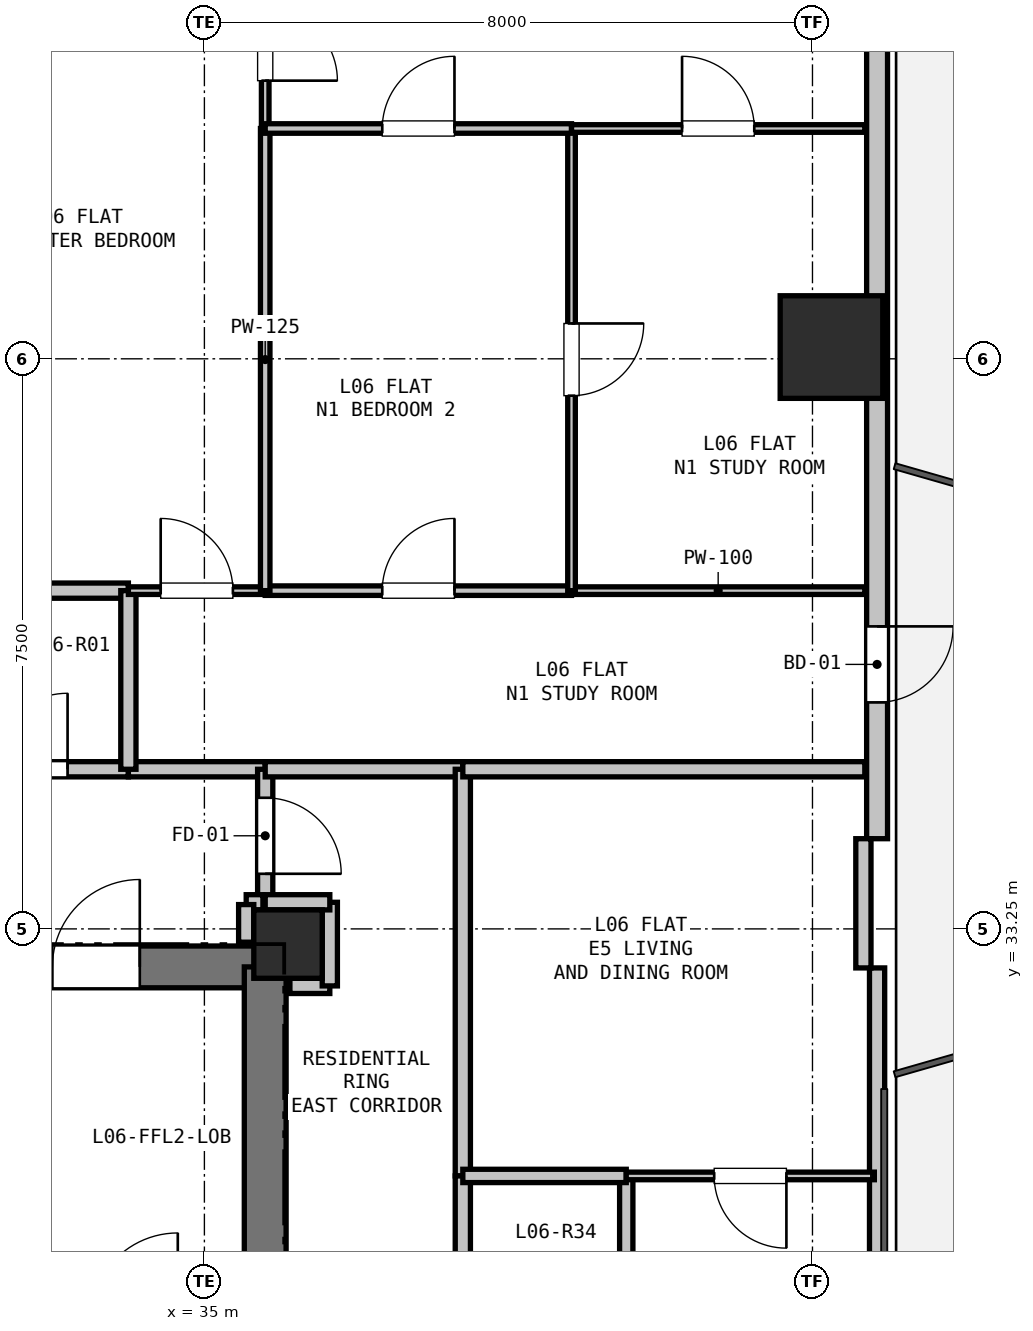
"""IFC4 building model, lengths in metres.
Left out: names, types, materials, properties, quantities, classifications, styles, units other than length and angle.
Written with IfcOpenShell. Run it as: python <this file> out.ifc"""

import sys

from ifc_helpers import new_model, si_unit, direction, frame, frame_2d, origin, origin_2d, place, context, subcontext, project, spatial, rectangle, hollow_rectangle, extrude, element, fill, save


model = new_model("IFC4")
c1 = context("Model", 3, precision=1e-05, world=origin(), true_north=direction((0.0, 1.0)))
c2 = subcontext(c1, "Body", "Model", "MODEL_VIEW")
j1 = project(units=[si_unit("LENGTHUNIT", "METRE"), si_unit("PLANEANGLEUNIT", "RADIAN")], contexts=[c1])
p1 = place(None, origin())
s1 = spatial("IfcSite", under=j1, at=p1, CompositionType="ELEMENT")
p2 = place(p1, origin())
s2 = spatial("IfcBuilding", under=s1, at=p2, CompositionType="ELEMENT")
p3 = place(p2, frame((0.0, 0.0, 25.8)))
s3 = spatial("IfcBuildingStorey", under=s2, at=p3, CompositionType="ELEMENT", Elevation=25.8)
p4 = place(p3, frame((36.1, 33.05, 0.0), z_axis=(0.0, 0.0, 1.0), x_axis=(1.0, 0.0, 0.0)))
e1 = element("IfcColumn", 1, at=p4, inside=s3, PredefinedType="COLUMN", context=c2, shape_type="SweptSolid", body=[
    extrude(rectangle(XDim=0.9, YDim=0.9, at=origin_2d()), origin(), (0.0, 0.0, 1.0), 3.3),
])
p5 = place(p3, frame((43.25, 40.905, 0.0), z_axis=(0.0, 0.0, 1.0), x_axis=(1.0, 0.0, 0.0)))
e2 = element("IfcColumn", 2, at=p5, inside=s3, PredefinedType="COLUMN", context=c2, shape_type="SweptSolid", body=[
    extrude(hollow_rectangle(XDim=1.35, YDim=1.35, WallThickness=0.036, at=origin_2d()), origin(), (0.0, 0.0, 1.0), 3.3),
])
p6 = place(p3, frame((28.232, 43.454, 0.0), z_axis=(0.0, 0.0, 1.0), x_axis=(0.86603192154, 0.499988710747, 0.0)))
e3 = element("IfcWall", 3, at=p6, inside=s3, PredefinedType="SOLIDWALL", context=c2, shape_type="SweptSolid", body=[
    extrude(rectangle(XDim=12.673, YDim=0.275, at=frame_2d((6.336, 0.0))), origin(), (0.0, 0.0, 1.0), 2.66),
])
p7 = place(p6, frame((4.68, 0.0, 0.9)))
e4 = element("IfcOpeningElement", 4, at=p7, cuts=e3, PredefinedType="OPENING", context=c2, shape_type="SweptSolid", body=[
    extrude(rectangle(XDim=1.2, YDim=1.4, at=frame_2d((0.6, 0.7))), frame((0.0, 0.147, 0.0), z_axis=(0.0, -1.0, 0.0), x_axis=(1.0, 0.0, 0.0)), (0.0, 0.0, 1.0), 0.295),
])
p8 = place(p3, frame((43.85, 47.11, 0.0), z_axis=(0.0, 0.0, 1.0), x_axis=(0.0, -1.0, 0.0)))
e5 = element("IfcWall", 5, at=p8, inside=s3, PredefinedType="SOLIDWALL", context=c2, shape_type="SweptSolid", body=[
    extrude(rectangle(XDim=12.673, YDim=0.275, at=frame_2d((6.336, 0.0))), origin(), (0.0, 0.0, 1.0), 2.66),
])
p9 = place(p8, frame((9.88, 0.0, 0.0)))
e6 = element("IfcOpeningElement", 6, at=p9, cuts=e5, PredefinedType="OPENING", context=c2, shape_type="SweptSolid", body=[
    extrude(rectangle(XDim=1.0, YDim=2.1, at=frame_2d((0.5, 1.05))), frame((0.0, 0.147, 0.0), z_axis=(0.0, -1.0, 0.0), x_axis=(1.0, 0.0, 0.0)), (0.0, 0.0, 1.0), 0.295),
])
p10 = place(p3, frame((43.85, 32.737, 0.0), z_axis=(0.0, 0.0, 1.0), x_axis=(0.0, -1.0, 0.0)))
e7 = element("IfcWall", 7, at=p10, inside=s3, PredefinedType="PARAPET", context=c2, shape_type="SweptSolid", body=[
    extrude(rectangle(XDim=11.973, YDim=0.2, at=frame_2d((5.987, 0.0))), origin(), (0.0, 0.0, 1.0), 0.2),
])
p11 = place(p3, frame((43.67, 34.437, 0.0), z_axis=(0.0, 0.0, 1.0), x_axis=(0.0, -1.0, 0.0)))
e8 = element("IfcWall", 8, at=p11, inside=s3, PredefinedType="PARAPET", context=c2, shape_type="SweptSolid", body=[
    extrude(rectangle(XDim=1.7, YDim=0.2, at=frame_2d((0.85, 0.0))), origin(), (0.0, 0.0, 1.0), 2.66),
])
p12 = place(p3, frame((32.35, 32.75, 0.0), z_axis=(0.0, 0.0, 1.0), x_axis=(1.0, 0.0, 0.0)))
e9 = element("IfcWall", 9, at=p12, inside=s3, PredefinedType="SHEAR", context=c2, shape_type="SweptSolid", body=[
    extrude(rectangle(XDim=3.45, YDim=0.55, at=frame_2d((1.725, 0.0))), origin(), (0.0, 0.0, 1.0), 3.04),
])
p13 = place(p12, frame((0.65, 0.0, 0.0)))
e10 = element("IfcOpeningElement", 10, at=p13, cuts=e9, PredefinedType="OPENING", context=c2, shape_type="SweptSolid", body=[
    extrude(rectangle(XDim=1.15, YDim=2.15, at=frame_2d((0.575, 1.075))), frame((0.0, 0.285, 0.0), z_axis=(0.0, -1.0, 0.0), x_axis=(1.0, 0.0, 0.0)), (0.0, 0.0, 1.0), 0.57),
])
p14 = place(p3, frame((35.8, 32.75, 0.0), z_axis=(0.0, 0.0, 1.0), x_axis=(0.0, -1.0, 0.0)))
e11 = element("IfcWall", 11, at=p14, inside=s3, PredefinedType="SHEAR", context=c2, shape_type="SweptSolid", body=[
    extrude(rectangle(XDim=4.65, YDim=0.55, at=frame_2d((2.325, 0.0))), origin(), (0.0, 0.0, 1.0), 3.04),
])
p15 = place(p3, frame((31.4, 35.35, 0.0), z_axis=(0.0, 0.0, 1.0), x_axis=(1.0, 0.0, 0.0)))
e12 = element("IfcWall", 12, at=p15, inside=s3, PredefinedType="PARTITIONING", context=c2, shape_type="SweptSolid", body=[
    extrude(rectangle(XDim=2.6, YDim=0.2, at=frame_2d((1.3, 0.0))), origin(), (0.0, 0.0, 1.0), 3.04),
])
p16 = place(p15, frame((0.8, 0.0, 0.0)))
e13 = element("IfcOpeningElement", 13, at=p16, cuts=e12, PredefinedType="OPENING", context=c2, shape_type="SweptSolid", body=[
    extrude(rectangle(XDim=1.0, YDim=2.15, at=frame_2d((0.5, 1.075))), frame((0.0, 0.11, 0.0), z_axis=(0.0, -1.0, 0.0), x_axis=(1.0, 0.0, 0.0)), (0.0, 0.0, 1.0), 0.22),
])
p17 = place(p3, frame((34.0, 35.35, 0.0), z_axis=(0.0, 0.0, 1.0), x_axis=(1.0, 0.0, 0.0)))
e14 = element("IfcWall", 14, at=p17, inside=s3, PredefinedType="PARTITIONING", context=c2, shape_type="SweptSolid", body=[
    extrude(rectangle(XDim=1.8, YDim=0.2, at=frame_2d((0.9, 0.0))), origin(), (0.0, 0.0, 1.0), 3.04),
])
p18 = place(p3, frame((35.8, 35.35, 0.0), z_axis=(0.0, 0.0, 1.0), x_axis=(0.0, -1.0, 0.0)))
e15 = element("IfcWall", 15, at=p18, inside=s3, PredefinedType="PARTITIONING", context=c2, shape_type="SweptSolid", body=[
    extrude(rectangle(XDim=1.75, YDim=0.2, at=frame_2d((0.875, 0.0))), origin(), (0.0, 0.0, 1.0), 3.04),
])
p19 = place(p18, frame((0.375, 0.0, 0.0)))
e16 = element("IfcOpeningElement", 16, at=p19, cuts=e15, PredefinedType="OPENING", context=c2, shape_type="SweptSolid", body=[
    extrude(rectangle(XDim=1.0, YDim=2.15, at=frame_2d((0.5, 1.075))), frame((0.0, 0.11, 0.0), z_axis=(0.0, -1.0, 0.0), x_axis=(1.0, 0.0, 0.0)), (0.0, 0.0, 1.0), 0.22),
])
p20 = place(p3, frame((35.77, 33.6, 0.0), z_axis=(0.0, 0.0, 1.0), x_axis=(-1.0, 0.0, 0.0)))
e17 = element("IfcWall", 17, at=p20, inside=s3, PredefinedType="PARTITIONING", context=c2, shape_type="SweptSolid", body=[
    extrude(rectangle(XDim=0.22, YDim=0.2, at=frame_2d((0.11, 0.0))), origin(), (0.0, 0.0, 1.0), 3.04),
])
p21 = place(p3, frame((35.55, 33.57, 0.0), z_axis=(0.0, 0.0, 1.0), x_axis=(0.0, -1.0, 0.0)))
e18 = element("IfcWall", 18, at=p21, inside=s3, PredefinedType="PARTITIONING", context=c2, shape_type="SweptSolid", body=[
    extrude(rectangle(XDim=0.495, YDim=0.2, at=frame_2d((0.248, 0.0))), origin(), (0.0, 0.0, 1.0), 2.488),
])
p22 = place(p3, frame((36.125, 32.5, 0.0), z_axis=(0.0, 0.0, 1.0), x_axis=(1.0, 0.0, 0.0)))
e19 = element("IfcWall", 19, at=p22, inside=s3, PredefinedType="PARTITIONING", context=c2, shape_type="SweptSolid", body=[
    extrude(rectangle(XDim=0.525, YDim=0.2, at=frame_2d((0.262, 0.0))), origin(), (0.0, 0.0, 1.0), 2.488),
])
p23 = place(p3, frame((36.65, 32.5, 0.0), z_axis=(0.0, 0.0, 1.0), x_axis=(0.0, 1.0, 0.0)))
e20 = element("IfcWall", 20, at=p23, inside=s3, PredefinedType="PARTITIONING", context=c2, shape_type="SweptSolid", body=[
    extrude(rectangle(XDim=1.1, YDim=0.2, at=frame_2d((0.55, 0.0))), origin(), (0.0, 0.0, 1.0), 2.337),
])
p24 = place(p3, frame((36.65, 33.6, 0.0), z_axis=(0.0, 0.0, 1.0), x_axis=(-1.0, 0.0, 0.0)))
e21 = element("IfcWall", 21, at=p24, inside=s3, PredefinedType="PARTITIONING", context=c2, shape_type="SweptSolid", body=[
    extrude(rectangle(XDim=0.85, YDim=0.2, at=frame_2d((0.425, 0.0))), origin(), (0.0, 0.0, 1.0), 2.337),
])
p25 = place(p3, frame((35.8, 35.35, 0.0), z_axis=(0.0, 0.0, 1.0), x_axis=(1.0, 0.0, 0.0)))
e22 = element("IfcWall", 22, at=p25, inside=s3, PredefinedType="PARTITIONING", context=c2, shape_type="SweptSolid", body=[
    extrude(rectangle(XDim=2.6, YDim=0.2, at=frame_2d((1.3, 0.0))), origin(), (0.0, 0.0, 1.0), 2.337),
])
p26 = place(p3, frame((38.4, 35.35, 0.0), z_axis=(0.0, 0.0, 1.0), x_axis=(0.0, -1.0, 0.0)))
e23 = element("IfcWall", 23, at=p26, inside=s3, PredefinedType="PARTITIONING", context=c2, shape_type="SweptSolid", body=[
    extrude(rectangle(XDim=5.35, YDim=0.2, at=frame_2d((2.675, 0.0))), origin(), (0.0, 0.0, 1.0), 2.337),
])
p27 = place(p3, frame((38.4, 30.0, 0.0), z_axis=(0.0, 0.0, 1.0), x_axis=(0.0, -1.0, 0.0)))
e24 = element("IfcWall", 24, at=p27, inside=s3, PredefinedType="PARTITIONING", context=c2, shape_type="SweptSolid", body=[
    extrude(rectangle(XDim=2.4, YDim=0.2, at=frame_2d((1.2, 0.0))), origin(), (0.0, 0.0, 1.0), 3.04),
])
p28 = place(p3, frame((40.55, 30.0, 0.0), z_axis=(0.0, 0.0, 1.0), x_axis=(0.0, -1.0, 0.0)))
e25 = element("IfcWall", 25, at=p28, inside=s3, PredefinedType="PLUMBINGWALL", context=c2, shape_type="SweptSolid", body=[
    extrude(rectangle(XDim=2.4, YDim=0.175, at=frame_2d((1.2, 0.0))), origin(), (0.0, 0.0, 1.0), 3.04),
])
p29 = place(p3, frame((38.4, 30.0, 0.0), z_axis=(0.0, 0.0, 1.0), x_axis=(1.0, 0.0, 0.0)))
e26 = element("IfcWall", 26, at=p29, inside=s3, PredefinedType="PLUMBINGWALL", context=c2, shape_type="SweptSolid", body=[
    extrude(rectangle(XDim=2.15, YDim=0.175, at=frame_2d((1.075, 0.0))), origin(), (0.0, 0.0, 1.0), 3.04),
])
p30 = place(p3, frame((31.4, 37.7, 0.0), z_axis=(0.0, 0.0, 1.0), x_axis=(1.0, 0.0, 0.0)))
e27 = element("IfcWall", 27, at=p30, inside=s3, PredefinedType="PARTITIONING", context=c2, shape_type="SweptSolid", body=[
    extrude(rectangle(XDim=2.6, YDim=0.2, at=frame_2d((1.3, 0.0))), origin(), (0.0, 0.0, 1.0), 3.04),
])
p31 = place(p3, frame((34.0, 37.7, 0.0), z_axis=(0.0, 0.0, 1.0), x_axis=(0.0, -1.0, 0.0)))
e28 = element("IfcWall", 28, at=p31, inside=s3, PredefinedType="PARTITIONING", context=c2, shape_type="SweptSolid", body=[
    extrude(rectangle(XDim=2.35, YDim=0.2, at=frame_2d((1.175, 0.0))), origin(), (0.0, 0.0, 1.0), 3.04),
])
p32 = place(p3, frame((43.688, 35.35, 0.0), z_axis=(0.0, 0.0, 1.0), x_axis=(-1.0, 0.0, 0.0)))
e29 = element("IfcWall", 29, at=p32, inside=s3, PredefinedType="PARTITIONING", context=c2, shape_type="SweptSolid", body=[
    extrude(rectangle(XDim=5.289, YDim=0.2, at=frame_2d((2.644, 0.0))), origin(), (0.0, 0.0, 1.0), 2.337),
])
p33 = place(p3, frame((34.0, 37.7, 0.0), z_axis=(0.0, 0.0, 1.0), x_axis=(1.0, 0.0, 0.0)))
e30 = element("IfcWall", 30, at=p33, inside=s3, PredefinedType="PARTITIONING", context=c2, shape_type="SweptSolid", body=[
    extrude(rectangle(XDim=1.8, YDim=0.1, at=frame_2d((0.9, 0.0))), origin(), (0.0, 0.0, 1.0), 3.04),
])
p34 = place(p33, frame((0.425, 0.0, 0.0)))
e31 = element("IfcOpeningElement", 31, at=p34, cuts=e30, PredefinedType="OPENING", context=c2, shape_type="SweptSolid", body=[
    extrude(rectangle(XDim=0.95, YDim=2.1, at=frame_2d((0.475, 1.05))), frame((0.0, 0.06, 0.0), z_axis=(0.0, -1.0, 0.0), x_axis=(1.0, 0.0, 0.0)), (0.0, 0.0, 1.0), 0.12),
])
p35 = place(p3, frame((35.8, 37.7, 0.0), z_axis=(0.0, 0.0, 1.0), x_axis=(1.0, 0.0, 0.0)))
e32 = element("IfcWall", 32, at=p35, inside=s3, PredefinedType="PARTITIONING", context=c2, shape_type="SweptSolid", body=[
    extrude(rectangle(XDim=4.03, YDim=0.125, at=frame_2d((2.015, 0.0))), origin(), (0.0, 0.0, 1.0), 2.337),
])
p36 = place(p35, frame((1.54, 0.0, 0.0)))
e33 = element("IfcOpeningElement", 33, at=p36, cuts=e32, PredefinedType="OPENING", context=c2, shape_type="SweptSolid", body=[
    extrude(rectangle(XDim=0.95, YDim=2.1, at=frame_2d((0.475, 1.05))), frame((0.0, 0.073, 0.0), z_axis=(0.0, -1.0, 0.0), x_axis=(1.0, 0.0, 0.0)), (0.0, 0.0, 1.0), 0.145),
])
p37 = place(p3, frame((39.83, 37.7, 0.0), z_axis=(0.0, 0.0, 1.0), x_axis=(1.0, 0.0, 0.0)))
e34 = element("IfcWall", 34, at=p37, inside=s3, PredefinedType="PARTITIONING", context=c2, shape_type="SweptSolid", body=[
    extrude(rectangle(XDim=3.858, YDim=0.1, at=frame_2d((1.929, 0.0))), origin(), (0.0, 0.0, 1.0), 2.337),
])
p38 = place(p3, frame((35.8, 47.637, 0.0), z_axis=(0.0, 0.0, 1.0), x_axis=(0.0, -1.0, 0.0)))
e35 = element("IfcWall", 35, at=p38, inside=s3, PredefinedType="PARTITIONING", context=c2, shape_type="SweptSolid", body=[
    extrude(rectangle(XDim=3.857, YDim=0.1, at=frame_2d((1.928, 0.0))), origin(), (0.0, 0.0, 1.0), 2.65),
])
p39 = place(p38, frame((2.277, 0.0, 0.0)))
e36 = element("IfcOpeningElement", 36, at=p39, cuts=e35, PredefinedType="OPENING", context=c2, shape_type="SweptSolid", body=[
    extrude(rectangle(XDim=0.95, YDim=2.1, at=frame_2d((0.475, 1.05))), frame((0.0, 0.06, 0.0), z_axis=(0.0, -1.0, 0.0), x_axis=(1.0, 0.0, 0.0)), (0.0, 0.0, 1.0), 0.12),
])
p40 = place(p3, frame((35.8, 43.78, 0.0), z_axis=(0.0, 0.0, 1.0), x_axis=(0.0, -1.0, 0.0)))
e37 = element("IfcWall", 37, at=p40, inside=s3, PredefinedType="PARTITIONING", context=c2, shape_type="SweptSolid", body=[
    extrude(rectangle(XDim=6.08, YDim=0.125, at=frame_2d((3.04, 0.0))), origin(), (0.0, 0.0, 1.0), 3.04),
])
p41 = place(p3, frame((39.83, 43.78, 0.0), z_axis=(0.0, 0.0, 1.0), x_axis=(0.0, -1.0, 0.0)))
e38 = element("IfcWall", 38, at=p41, inside=s3, PredefinedType="PARTITIONING", context=c2, shape_type="SweptSolid", body=[
    extrude(rectangle(XDim=6.08, YDim=0.1, at=frame_2d((3.04, 0.0))), origin(), (0.0, 0.0, 1.0), 3.04),
])
p42 = place(p41, frame((2.565, 0.0, 0.0)))
e39 = element("IfcOpeningElement", 39, at=p42, cuts=e38, PredefinedType="OPENING", context=c2, shape_type="SweptSolid", body=[
    extrude(rectangle(XDim=0.95, YDim=2.1, at=frame_2d((0.475, 1.05))), frame((0.0, 0.06, 0.0), z_axis=(0.0, -1.0, 0.0), x_axis=(1.0, 0.0, 0.0)), (0.0, 0.0, 1.0), 0.12),
])
p43 = place(p3, frame((35.8, 43.78, 0.0), z_axis=(0.0, 0.0, 1.0), x_axis=(1.0, 0.0, 0.0)))
e40 = element("IfcWall", 40, at=p43, inside=s3, PredefinedType="PARTITIONING", context=c2, shape_type="SweptSolid", body=[
    extrude(rectangle(XDim=4.03, YDim=0.125, at=frame_2d((2.015, 0.0))), origin(), (0.0, 0.0, 1.0), 2.337),
])
p44 = place(p43, frame((1.54, 0.0, 0.0)))
e41 = element("IfcOpeningElement", 41, at=p44, cuts=e40, PredefinedType="OPENING", context=c2, shape_type="SweptSolid", body=[
    extrude(rectangle(XDim=0.95, YDim=2.1, at=frame_2d((0.475, 1.05))), frame((0.0, 0.073, 0.0), z_axis=(0.0, -1.0, 0.0), x_axis=(1.0, 0.0, 0.0)), (0.0, 0.0, 1.0), 0.145),
])
p45 = place(p3, frame((39.83, 43.78, 0.0), z_axis=(0.0, 0.0, 1.0), x_axis=(1.0, 0.0, 0.0)))
e42 = element("IfcWall", 42, at=p45, inside=s3, PredefinedType="PARTITIONING", context=c2, shape_type="SweptSolid", body=[
    extrude(rectangle(XDim=3.858, YDim=0.1, at=frame_2d((1.929, 0.0))), origin(), (0.0, 0.0, 1.0), 2.65),
])
p46 = place(p45, frame((1.454, 0.0, 0.0)))
e43 = element("IfcOpeningElement", 43, at=p46, cuts=e42, PredefinedType="OPENING", context=c2, shape_type="SweptSolid", body=[
    extrude(rectangle(XDim=0.95, YDim=2.1, at=frame_2d((0.475, 1.05))), frame((0.0, 0.06, 0.0), z_axis=(0.0, -1.0, 0.0), x_axis=(1.0, 0.0, 0.0)), (0.0, 0.0, 1.0), 0.12),
])
p47 = place(p3, frame((43.814, 30.0, 0.0), z_axis=(0.0, 0.0, 1.0), x_axis=(-1.0, 0.0, 0.0)))
e44 = element("IfcWall", 44, at=p47, inside=s3, PredefinedType="PARTITIONING", context=c2, shape_type="SweptSolid", body=[
    extrude(rectangle(XDim=3.264, YDim=0.1, at=frame_2d((1.632, 0.0))), origin(), (0.0, 0.0, 1.0), 2.365),
])
p48 = place(p47, frame((1.157, 0.0, 0.0)))
e45 = element("IfcOpeningElement", 45, at=p48, cuts=e44, PredefinedType="OPENING", context=c2, shape_type="SweptSolid", body=[
    extrude(rectangle(XDim=0.95, YDim=2.1, at=frame_2d((0.475, 1.05))), frame((0.0, 0.06, 0.0), z_axis=(0.0, -1.0, 0.0), x_axis=(1.0, 0.0, 0.0)), (0.0, 0.0, 1.0), 0.12),
])
p49 = place(p9, origin())
e46 = element("IfcDoor", 46, at=p49, inside=s3, OperationType="SINGLE_SWING_LEFT", PredefinedType="DOOR", context=c2, shape_type="SweptSolid", body=[
    extrude(rectangle(XDim=1.0, YDim=2.1, at=frame_2d((0.5, 1.05))), frame((0.0, 0.025, 0.0), z_axis=(0.0, -1.0, 0.0), x_axis=(1.0, 0.0, 0.0)), (0.0, 0.0, 1.0), 0.05),
])
fill(e6, e46)
p50 = place(p13, origin())
e47 = element("IfcDoor", 47, at=p50, inside=s3, OperationType="SINGLE_SWING_RIGHT", PredefinedType="DOOR", context=c2, shape_type="SweptSolid", body=[
    extrude(rectangle(XDim=1.15, YDim=2.15, at=frame_2d((0.575, 1.075))), frame((0.0, 0.025, 0.0), z_axis=(0.0, -1.0, 0.0), x_axis=(1.0, 0.0, 0.0)), (0.0, 0.0, 1.0), 0.05),
])
fill(e10, e47)
p51 = place(p19, origin())
e48 = element("IfcDoor", 48, at=p51, inside=s3, OperationType="SINGLE_SWING_RIGHT", PredefinedType="DOOR", context=c2, shape_type="SweptSolid", body=[
    extrude(rectangle(XDim=1.0, YDim=2.15, at=frame_2d((0.5, 1.075))), frame((0.0, 0.025, 0.0), z_axis=(0.0, -1.0, 0.0), x_axis=(1.0, 0.0, 0.0)), (0.0, 0.0, 1.0), 0.05),
])
fill(e16, e48)
p52 = place(p16, origin())
e49 = element("IfcDoor", 49, at=p52, inside=s3, OperationType="SINGLE_SWING_RIGHT", PredefinedType="DOOR", context=c2, shape_type="SweptSolid", body=[
    extrude(rectangle(XDim=1.0, YDim=2.15, at=frame_2d((0.5, 1.075))), frame((0.0, 0.025, 0.0), z_axis=(0.0, -1.0, 0.0), x_axis=(1.0, 0.0, 0.0)), (0.0, 0.0, 1.0), 0.05),
])
fill(e13, e49)
p53 = place(p34, origin())
e50 = element("IfcDoor", 50, at=p53, inside=s3, OperationType="SINGLE_SWING_LEFT", PredefinedType="DOOR", context=c2, shape_type="SweptSolid", body=[
    extrude(rectangle(XDim=0.95, YDim=2.1, at=frame_2d((0.475, 1.05))), frame((0.0, 0.025, 0.0), z_axis=(0.0, -1.0, 0.0), x_axis=(1.0, 0.0, 0.0)), (0.0, 0.0, 1.0), 0.05),
])
fill(e31, e50)
p54 = place(p36, origin())
e51 = element("IfcDoor", 51, at=p54, inside=s3, OperationType="SINGLE_SWING_RIGHT", PredefinedType="DOOR", context=c2, shape_type="SweptSolid", body=[
    extrude(rectangle(XDim=0.95, YDim=2.1, at=frame_2d((0.475, 1.05))), frame((0.0, 0.025, 0.0), z_axis=(0.0, -1.0, 0.0), x_axis=(1.0, 0.0, 0.0)), (0.0, 0.0, 1.0), 0.05),
])
fill(e33, e51)
p55 = place(p39, origin())
e52 = element("IfcDoor", 52, at=p55, inside=s3, OperationType="SINGLE_SWING_RIGHT", PredefinedType="DOOR", context=c2, shape_type="SweptSolid", body=[
    extrude(rectangle(XDim=0.95, YDim=2.1, at=frame_2d((0.475, 1.05))), frame((0.0, 0.025, 0.0), z_axis=(0.0, -1.0, 0.0), x_axis=(1.0, 0.0, 0.0)), (0.0, 0.0, 1.0), 0.05),
])
fill(e36, e52)
p56 = place(p42, origin())
e53 = element("IfcDoor", 53, at=p56, inside=s3, OperationType="SINGLE_SWING_LEFT", PredefinedType="DOOR", context=c2, shape_type="SweptSolid", body=[
    extrude(rectangle(XDim=0.95, YDim=2.1, at=frame_2d((0.475, 1.05))), frame((0.0, 0.025, 0.0), z_axis=(0.0, -1.0, 0.0), x_axis=(1.0, 0.0, 0.0)), (0.0, 0.0, 1.0), 0.05),
])
fill(e39, e53)
p57 = place(p44, origin())
e54 = element("IfcDoor", 54, at=p57, inside=s3, OperationType="SINGLE_SWING_RIGHT", PredefinedType="DOOR", context=c2, shape_type="SweptSolid", body=[
    extrude(rectangle(XDim=0.95, YDim=2.1, at=frame_2d((0.475, 1.05))), frame((0.0, 0.025, 0.0), z_axis=(0.0, -1.0, 0.0), x_axis=(1.0, 0.0, 0.0)), (0.0, 0.0, 1.0), 0.05),
])
fill(e41, e54)
p58 = place(p46, origin())
e55 = element("IfcDoor", 55, at=p58, inside=s3, OperationType="SINGLE_SWING_LEFT", PredefinedType="DOOR", context=c2, shape_type="SweptSolid", body=[
    extrude(rectangle(XDim=0.95, YDim=2.1, at=frame_2d((0.475, 1.05))), frame((0.0, 0.025, 0.0), z_axis=(0.0, -1.0, 0.0), x_axis=(1.0, 0.0, 0.0)), (0.0, 0.0, 1.0), 0.05),
])
fill(e43, e55)
p59 = place(p48, origin())
e56 = element("IfcDoor", 56, at=p59, inside=s3, OperationType="SINGLE_SWING_LEFT", PredefinedType="DOOR", context=c2, shape_type="SweptSolid", body=[
    extrude(rectangle(XDim=0.95, YDim=2.1, at=frame_2d((0.475, 1.05))), frame((0.0, 0.025, 0.0), z_axis=(0.0, -1.0, 0.0), x_axis=(1.0, 0.0, 0.0)), (0.0, 0.0, 1.0), 0.05),
])
fill(e45, e56)
save(model, sys.argv[1])
